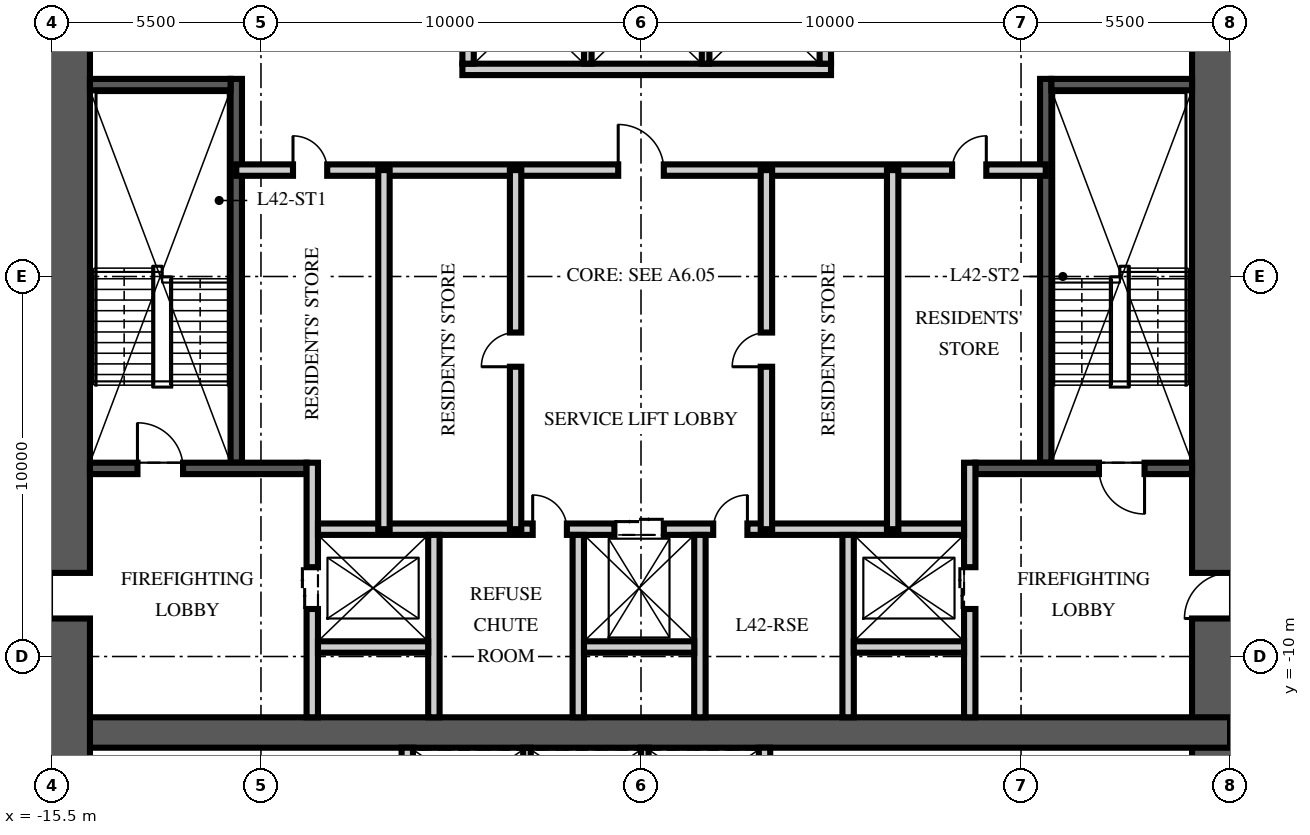
"""IFC4 building model, lengths in metres.
Left out: names, types, materials, properties, quantities, classifications, styles, units other than length and angle.
Written with IfcOpenShell. Run it as: python <this file> out.ifc"""

import sys

from ifc_helpers import new_model, si_unit, direction, frame, frame_2d, origin, place, context, subcontext, project, spatial, rectangle, extrude, element, fill, save


model = new_model("IFC4")
c1 = context("Model", 3, precision=1e-05, world=origin(), true_north=direction((0.0, 1.0)))
c2 = subcontext(c1, "Body", "Model", "MODEL_VIEW")
j1 = project(units=[si_unit("LENGTHUNIT", "METRE"), si_unit("PLANEANGLEUNIT", "RADIAN")], contexts=[c1])
p1 = place(None, origin())
s1 = spatial("IfcSite", under=j1, at=p1, CompositionType="ELEMENT")
p2 = place(p1, origin())
s2 = spatial("IfcBuilding", under=s1, at=p2, CompositionType="ELEMENT")
p3 = place(p2, frame((0.0, 0.0, 167.25)))
s3 = spatial("IfcBuildingStorey", under=s2, at=p3, CompositionType="ELEMENT", Elevation=167.25)
p4 = place(p3, frame((15.5, -15.5, -0.25), z_axis=(0.0, 0.0, 1.0), x_axis=(0.0, 1.0, 0.0)))
e1 = element("IfcWall", 1, at=p4, inside=s3, PredefinedType="SHEAR", context=c2, shape_type="SweptSolid", body=[
    extrude(rectangle(XDim=31.0, YDim=2.0, at=frame_2d((15.5, 0.0))), origin(), (0.0, 0.0, 1.0), 3.75),
])
p5 = place(p4, frame((6.5, 0.0, 0.25)))
e2 = element("IfcOpeningElement", 2, at=p5, cuts=e1, PredefinedType="OPENING", context=c2, shape_type="SweptSolid", body=[
    extrude(rectangle(XDim=1.2, YDim=2.1, at=frame_2d((0.6, 1.05))), frame((0.0, 1.01, 0.0), z_axis=(0.0, -1.0, 0.0), x_axis=(1.0, 0.0, 0.0)), (0.0, 0.0, 1.0), 2.02),
])
p6 = place(p4, frame((23.0, 0.0, 0.25)))
e3 = element("IfcOpeningElement", 3, at=p6, cuts=e1, PredefinedType="OPENING", context=c2, shape_type="SweptSolid", body=[
    extrude(rectangle(XDim=1.8, YDim=2.1, at=frame_2d((0.9, 1.05))), frame((0.0, 1.01, 0.0), z_axis=(0.0, -1.0, 0.0), x_axis=(1.0, 0.0, 0.0)), (0.0, 0.0, 1.0), 2.02),
])
p7 = place(p3, frame((-15.5, -12.0, -0.25), z_axis=(0.0, 0.0, 1.0), x_axis=(1.0, 0.0, 0.0)))
e4 = element("IfcWall", 4, at=p7, inside=s3, PredefinedType="SHEAR", context=c2, shape_type="SweptSolid", body=[
    extrude(rectangle(XDim=31.0, YDim=0.8, at=frame_2d((15.5, 0.0))), origin(), (0.0, 0.0, 1.0), 3.75),
])
p8 = place(p3, frame((-15.5, -15.5, -0.25), z_axis=(0.0, 0.0, 1.0), x_axis=(0.0, 1.0, 0.0)))
e5 = element("IfcWall", 5, at=p8, inside=s3, PredefinedType="SHEAR", context=c2, shape_type="SweptSolid", body=[
    extrude(rectangle(XDim=31.0, YDim=2.0, at=frame_2d((15.5, 0.0))), origin(), (0.0, 0.0, 1.0), 3.75),
])
p9 = place(p8, frame((6.5, 0.0, 0.25)))
e6 = element("IfcOpeningElement", 6, at=p9, cuts=e5, PredefinedType="OPENING", context=c2, shape_type="SweptSolid", body=[
    extrude(rectangle(XDim=1.2, YDim=2.1, at=frame_2d((0.6, 1.05))), frame((0.0, 1.01, 0.0), z_axis=(0.0, -1.0, 0.0), x_axis=(1.0, 0.0, 0.0)), (0.0, 0.0, 1.0), 2.02),
])
p10 = place(p8, frame((23.0, 0.0, 0.25)))
e7 = element("IfcOpeningElement", 7, at=p10, cuts=e5, PredefinedType="OPENING", context=c2, shape_type="SweptSolid", body=[
    extrude(rectangle(XDim=1.8, YDim=2.1, at=frame_2d((0.9, 1.05))), frame((0.0, 1.01, 0.0), z_axis=(0.0, -1.0, 0.0), x_axis=(1.0, 0.0, 0.0)), (0.0, 0.0, 1.0), 2.02),
])
p11 = place(p3, frame((-10.65, -4.9, 0.0), z_axis=(0.0, 0.0, 1.0), x_axis=(0.0, 1.0, 0.0)))
e8 = element("IfcWall", 8, at=p11, inside=s3, PredefinedType="SOLIDWALL", context=c2, shape_type="SweptSolid", body=[
    extrude(rectangle(XDim=10.1, YDim=0.3, at=frame_2d((5.05, 0.0))), origin(), (0.0, 0.0, 1.0), 3.5),
])
p12 = place(p3, frame((-14.5, -5.05, 0.0), z_axis=(0.0, 0.0, 1.0), x_axis=(1.0, 0.0, 0.0)))
e9 = element("IfcWall", 9, at=p12, inside=s3, PredefinedType="SOLIDWALL", context=c2, shape_type="SweptSolid", body=[
    extrude(rectangle(XDim=5.7, YDim=0.3, at=frame_2d((2.85, 0.0))), origin(), (0.0, 0.0, 1.0), 3.5),
])
p13 = place(p12, frame((1.25, 0.0, 0.0)))
e10 = element("IfcOpeningElement", 10, at=p13, cuts=e9, PredefinedType="OPENING", context=c2, shape_type="SweptSolid", body=[
    extrude(rectangle(XDim=1.2, YDim=2.1, at=frame_2d((0.6, 1.05))), frame((0.0, 0.16, 0.0), z_axis=(0.0, -1.0, 0.0), x_axis=(1.0, 0.0, 0.0)), (0.0, 0.0, 1.0), 0.32),
])
p14 = place(p3, frame((-14.5, 5.05, 0.0), z_axis=(0.0, 0.0, 1.0), x_axis=(1.0, 0.0, 0.0)))
e11 = element("IfcWall", 11, at=p14, inside=s3, PredefinedType="SOLIDWALL", context=c2, shape_type="SweptSolid", body=[
    extrude(rectangle(XDim=3.7, YDim=0.3, at=frame_2d((1.85, 0.0))), origin(), (0.0, 0.0, 1.0), 3.5),
])
p15 = place(p3, frame((-8.65, -11.6, 0.0), z_axis=(0.0, 0.0, 1.0), x_axis=(0.0, 1.0, 0.0)))
e12 = element("IfcWall", 12, at=p15, inside=s3, PredefinedType="PARTITIONING", context=c2, shape_type="SweptSolid", body=[
    extrude(rectangle(XDim=6.7, YDim=0.3, at=frame_2d((3.35, 0.0))), origin(), (0.0, 0.0, 1.0), 3.5),
])
p16 = place(p15, frame((2.85, 0.0, 0.0)))
e13 = element("IfcOpeningElement", 13, at=p16, cuts=e12, PredefinedType="OPENING", context=c2, shape_type="SweptSolid", body=[
    extrude(rectangle(XDim=1.1, YDim=2.1, at=frame_2d((0.55, 1.05))), frame((0.0, 0.16, 0.0), z_axis=(0.0, -1.0, 0.0), x_axis=(1.0, 0.0, 0.0)), (0.0, 0.0, 1.0), 0.32),
])
p17 = place(p3, frame((10.65, -4.9, 0.0), z_axis=(0.0, 0.0, 1.0), x_axis=(0.0, 1.0, 0.0)))
e14 = element("IfcWall", 14, at=p17, inside=s3, PredefinedType="SOLIDWALL", context=c2, shape_type="SweptSolid", body=[
    extrude(rectangle(XDim=10.1, YDim=0.3, at=frame_2d((5.05, 0.0))), origin(), (0.0, 0.0, 1.0), 3.5),
])
p18 = place(p3, frame((14.5, -5.05, 0.0), z_axis=(0.0, 0.0, 1.0), x_axis=(-1.0, 0.0, 0.0)))
e15 = element("IfcWall", 15, at=p18, inside=s3, PredefinedType="SOLIDWALL", context=c2, shape_type="SweptSolid", body=[
    extrude(rectangle(XDim=5.7, YDim=0.3, at=frame_2d((2.85, 0.0))), origin(), (0.0, 0.0, 1.0), 3.5),
])
p19 = place(p18, frame((1.25, 0.0, 0.0)))
e16 = element("IfcOpeningElement", 16, at=p19, cuts=e15, PredefinedType="OPENING", context=c2, shape_type="SweptSolid", body=[
    extrude(rectangle(XDim=1.2, YDim=2.1, at=frame_2d((0.6, 1.05))), frame((0.0, 0.16, 0.0), z_axis=(0.0, -1.0, 0.0), x_axis=(1.0, 0.0, 0.0)), (0.0, 0.0, 1.0), 0.32),
])
p20 = place(p3, frame((14.5, 5.05, 0.0), z_axis=(0.0, 0.0, 1.0), x_axis=(-1.0, 0.0, 0.0)))
e17 = element("IfcWall", 17, at=p20, inside=s3, PredefinedType="SOLIDWALL", context=c2, shape_type="SweptSolid", body=[
    extrude(rectangle(XDim=3.7, YDim=0.3, at=frame_2d((1.85, 0.0))), origin(), (0.0, 0.0, 1.0), 3.5),
])
p21 = place(p3, frame((8.65, -11.6, 0.0), z_axis=(0.0, 0.0, 1.0), x_axis=(0.0, 1.0, 0.0)))
e18 = element("IfcWall", 18, at=p21, inside=s3, PredefinedType="PARTITIONING", context=c2, shape_type="SweptSolid", body=[
    extrude(rectangle(XDim=6.7, YDim=0.3, at=frame_2d((3.35, 0.0))), origin(), (0.0, 0.0, 1.0), 3.5),
])
p22 = place(p21, frame((2.85, 0.0, 0.0)))
e19 = element("IfcOpeningElement", 19, at=p22, cuts=e18, PredefinedType="OPENING", context=c2, shape_type="SweptSolid", body=[
    extrude(rectangle(XDim=1.1, YDim=2.1, at=frame_2d((0.55, 1.05))), frame((0.0, 0.16, 0.0), z_axis=(0.0, -1.0, 0.0), x_axis=(1.0, 0.0, 0.0)), (0.0, 0.0, 1.0), 0.32),
])
p23 = place(p3, frame((-8.5, -6.65, 0.0), z_axis=(0.0, 0.0, 1.0), x_axis=(1.0, 0.0, 0.0)))
e20 = element("IfcWall", 20, at=p23, inside=s3, PredefinedType="PARTITIONING", context=c2, shape_type="SweptSolid", body=[
    extrude(rectangle(XDim=17.0, YDim=0.3, at=frame_2d((8.5, 0.0))), origin(), (0.0, 0.0, 1.0), 3.5),
])
p24 = place(p23, frame((7.8, 0.0, 0.0)))
e21 = element("IfcOpeningElement", 21, at=p24, cuts=e20, PredefinedType="OPENING", context=c2, shape_type="SweptSolid", body=[
    extrude(rectangle(XDim=1.3, YDim=2.4, at=frame_2d((0.65, 1.2))), frame((0.0, 0.16, 0.0), z_axis=(0.0, -1.0, 0.0), x_axis=(1.0, 0.0, 0.0)), (0.0, 0.0, 1.0), 0.32),
])
p25 = place(p23, frame((5.65, 0.0, 0.0)))
e22 = element("IfcOpeningElement", 22, at=p25, cuts=e20, PredefinedType="OPENING", context=c2, shape_type="SweptSolid", body=[
    extrude(rectangle(XDim=0.9, YDim=2.1, at=frame_2d((0.45, 1.05))), frame((0.0, 0.16, 0.0), z_axis=(0.0, -1.0, 0.0), x_axis=(1.0, 0.0, 0.0)), (0.0, 0.0, 1.0), 0.32),
])
p26 = place(p23, frame((10.4, 0.0, 0.0)))
e23 = element("IfcOpeningElement", 23, at=p26, cuts=e20, PredefinedType="OPENING", context=c2, shape_type="SweptSolid", body=[
    extrude(rectangle(XDim=0.9, YDim=2.1, at=frame_2d((0.45, 1.05))), frame((0.0, 0.16, 0.0), z_axis=(0.0, -1.0, 0.0), x_axis=(1.0, 0.0, 0.0)), (0.0, 0.0, 1.0), 0.32),
])
for number, where, z_axis, x_axis in (
    (24, (-5.45, -11.6, 0.0), (0.0, 0.0, 1.0), (0.0, 1.0, 0.0)),
    (25, (-1.65, -11.6, 0.0), (0.0, 0.0, 1.0), (0.0, 1.0, 0.0)),
    (26, (1.55, -11.6, 0.0), (0.0, 0.0, 1.0), (0.0, 1.0, 0.0)),
    (27, (5.45, -11.6, 0.0), (0.0, 0.0, 1.0), (0.0, 1.0, 0.0)),
):
    element("IfcWall", number, at=place(p3, frame(where, z_axis=z_axis, x_axis=x_axis)), inside=s3, PredefinedType="PARTITIONING", context=c2, shape_type="SweptSolid", body=[
        extrude(rectangle(XDim=4.8, YDim=0.3, at=frame_2d((2.4, 0.0))), origin(), (0.0, 0.0, 1.0), 3.5),
    ])
for number, where, z_axis, x_axis in (
    (28, (-8.5, -9.75, 0.0), (0.0, 0.0, 1.0), (1.0, 0.0, 0.0)),
    (29, (-1.5, -9.75, 0.0), (0.0, 0.0, 1.0), (1.0, 0.0, 0.0)),
    (30, (5.6, -9.75, 0.0), (0.0, 0.0, 1.0), (1.0, 0.0, 0.0)),
):
    element("IfcWall", number, at=place(p3, frame(where, z_axis=z_axis, x_axis=x_axis)), inside=s3, PredefinedType="PARTITIONING", context=c2, shape_type="SweptSolid", body=[
        extrude(rectangle(XDim=2.9, YDim=0.3, at=frame_2d((1.45, 0.0))), origin(), (0.0, 0.0, 1.0), 3.5),
    ])
p27 = place(p3, frame((-4.7, 5.45, 0.0), z_axis=(0.0, 0.0, 1.0), x_axis=(1.0, 0.0, 0.0)))
e31 = element("IfcWall", 31, at=p27, inside=s3, PredefinedType="PARTITIONING", context=c2, shape_type="SweptSolid", body=[
    extrude(rectangle(XDim=9.7, YDim=0.3, at=frame_2d((4.85, 0.0))), origin(), (0.0, 0.0, 1.0), 3.5),
])
for number, where, z_axis, x_axis in (
    (32, (-4.55, 5.6, 0.0), (0.0, 0.0, 1.0), (0.0, 1.0, 0.0)),
    (33, (4.85, 5.6, 0.0), (0.0, 0.0, 1.0), (0.0, 1.0, 0.0)),
):
    element("IfcWall", number, at=place(p3, frame(where, z_axis=z_axis, x_axis=x_axis)), inside=s3, PredefinedType="PARTITIONING", context=c2, shape_type="SweptSolid", body=[
        extrude(rectangle(XDim=2.8, YDim=0.3, at=frame_2d((1.4, 0.0))), origin(), (0.0, 0.0, 1.0), 3.5),
    ])
for number, where, z_axis, x_axis in (
    (34, (-1.4, 5.6, 0.0), (0.0, 0.0, 1.0), (0.0, 1.0, 0.0)),
    (35, (1.7, 5.6, 0.0), (0.0, 0.0, 1.0), (0.0, 1.0, 0.0)),
):
    element("IfcWall", number, at=place(p3, frame(where, z_axis=z_axis, x_axis=x_axis)), inside=s3, PredefinedType="PARTITIONING", context=c2, shape_type="SweptSolid", body=[
        extrude(rectangle(XDim=2.8, YDim=0.2, at=frame_2d((1.4, 0.0))), origin(), (0.0, 0.0, 1.0), 3.5),
    ])
for number, where, z_axis, x_axis in (
    (36, (-6.15, -14.5, 0.0), (0.0, 0.0, 1.0), (0.0, 1.0, 0.0)),
    (37, (3.25, -14.5, 0.0), (0.0, 0.0, 1.0), (0.0, 1.0, 0.0)),
):
    element("IfcWall", number, at=place(p3, frame(where, z_axis=z_axis, x_axis=x_axis)), inside=s3, PredefinedType="PARTITIONING", context=c2, shape_type="SweptSolid", body=[
        extrude(rectangle(XDim=2.1, YDim=0.3, at=frame_2d((1.05, 0.0))), origin(), (0.0, 0.0, 1.0), 3.5),
    ])
for number, where, z_axis, x_axis in (
    (38, (-3.0, -14.5, 0.0), (0.0, 0.0, 1.0), (0.0, 1.0, 0.0)),
    (39, (0.1, -14.5, 0.0), (0.0, 0.0, 1.0), (0.0, 1.0, 0.0)),
):
    element("IfcWall", number, at=place(p3, frame(where, z_axis=z_axis, x_axis=x_axis)), inside=s3, PredefinedType="PARTITIONING", context=c2, shape_type="SweptSolid", body=[
        extrude(rectangle(XDim=2.1, YDim=0.2, at=frame_2d((1.05, 0.0))), origin(), (0.0, 0.0, 1.0), 3.5),
    ])
p28 = place(p3, frame((-10.65, 2.8, 0.0), z_axis=(0.0, 0.0, 1.0), x_axis=(1.0, 0.0, 0.0)))
e40 = element("IfcWall", 40, at=p28, inside=s3, PredefinedType="PARTITIONING", context=c2, shape_type="SweptSolid", body=[
    extrude(rectangle(XDim=21.3, YDim=0.3, at=frame_2d((10.65, 0.0))), origin(), (0.0, 0.0, 1.0), 3.5),
])
p29 = place(p28, frame((10.05, 0.0, 0.0)))
e41 = element("IfcOpeningElement", 41, at=p29, cuts=e40, PredefinedType="OPENING", context=c2, shape_type="SweptSolid", body=[
    extrude(rectangle(XDim=1.2, YDim=2.1, at=frame_2d((0.6, 1.05))), frame((0.0, 0.16, 0.0), z_axis=(0.0, -1.0, 0.0), x_axis=(1.0, 0.0, 0.0)), (0.0, 0.0, 1.0), 0.32),
])
p30 = place(p28, frame((1.493, 0.0, 0.0)))
e42 = element("IfcOpeningElement", 42, at=p30, cuts=e40, PredefinedType="OPENING", context=c2, shape_type="SweptSolid", body=[
    extrude(rectangle(XDim=0.9, YDim=2.1, at=frame_2d((0.45, 1.05))), frame((0.0, 0.16, 0.0), z_axis=(0.0, -1.0, 0.0), x_axis=(1.0, 0.0, 0.0)), (0.0, 0.0, 1.0), 0.32),
])
p31 = place(p28, frame((18.836, 0.0, 0.0)))
e43 = element("IfcOpeningElement", 43, at=p31, cuts=e40, PredefinedType="OPENING", context=c2, shape_type="SweptSolid", body=[
    extrude(rectangle(XDim=0.9, YDim=2.1, at=frame_2d((0.45, 1.05))), frame((0.0, 0.16, 0.0), z_axis=(0.0, -1.0, 0.0), x_axis=(1.0, 0.0, 0.0)), (0.0, 0.0, 1.0), 0.32),
])
p32 = place(p3, frame((-3.3, -6.65, 0.0), z_axis=(0.0, 0.0, 1.0), x_axis=(0.0, 1.0, 0.0)))
e44 = element("IfcWall", 44, at=p32, inside=s3, PredefinedType="PARTITIONING", context=c2, shape_type="SweptSolid", body=[
    extrude(rectangle(XDim=9.45, YDim=0.3, at=frame_2d((4.725, 0.0))), origin(), (0.0, 0.0, 1.0), 3.5),
])
p33 = place(p32, frame((4.275, 0.0, 0.0)))
e45 = element("IfcOpeningElement", 45, at=p33, cuts=e44, PredefinedType="OPENING", context=c2, shape_type="SweptSolid", body=[
    extrude(rectangle(XDim=0.9, YDim=2.1, at=frame_2d((0.45, 1.05))), frame((0.0, 0.16, 0.0), z_axis=(0.0, -1.0, 0.0), x_axis=(1.0, 0.0, 0.0)), (0.0, 0.0, 1.0), 0.32),
])
p34 = place(p3, frame((3.3, -6.65, 0.0), z_axis=(0.0, 0.0, 1.0), x_axis=(0.0, 1.0, 0.0)))
e46 = element("IfcWall", 46, at=p34, inside=s3, PredefinedType="PARTITIONING", context=c2, shape_type="SweptSolid", body=[
    extrude(rectangle(XDim=9.45, YDim=0.3, at=frame_2d((4.725, 0.0))), origin(), (0.0, 0.0, 1.0), 3.5),
])
p35 = place(p34, frame((4.275, 0.0, 0.0)))
e47 = element("IfcOpeningElement", 47, at=p35, cuts=e46, PredefinedType="OPENING", context=c2, shape_type="SweptSolid", body=[
    extrude(rectangle(XDim=0.9, YDim=2.1, at=frame_2d((0.45, 1.05))), frame((0.0, 0.16, 0.0), z_axis=(0.0, -1.0, 0.0), x_axis=(1.0, 0.0, 0.0)), (0.0, 0.0, 1.0), 0.32),
])
for number, where, z_axis, x_axis in (
    (48, (-6.764, -6.65, 0.0), (0.0, 0.0, 1.0), (0.0, 1.0, 0.0)),
    (49, (6.622, -6.65, 0.0), (0.0, 0.0, 1.0), (0.0, 1.0, 0.0)),
):
    element("IfcWall", number, at=place(p3, frame(where, z_axis=z_axis, x_axis=x_axis)), inside=s3, PredefinedType="PARTITIONING", context=c2, shape_type="SweptSolid", body=[
        extrude(rectangle(XDim=9.45, YDim=0.3, at=frame_2d((4.725, 0.0))), origin(), (0.0, 0.0, 1.0), 3.5),
    ])
p36 = place(p13, origin())
e50 = element("IfcDoor", 50, at=p36, inside=s3, OperationType="SINGLE_SWING_LEFT", PredefinedType="DOOR", context=c2, shape_type="SweptSolid", body=[
    extrude(rectangle(XDim=1.2, YDim=2.1, at=frame_2d((0.6, 1.05))), frame((0.0, 0.025, 0.0), z_axis=(0.0, -1.0, 0.0), x_axis=(1.0, 0.0, 0.0)), (0.0, 0.0, 1.0), 0.05),
])
fill(e10, e50)
p37 = place(p9, origin())
e51 = element("IfcDoor", 51, at=p37, inside=s3, OperationType="SINGLE_SWING_LEFT", PredefinedType="DOOR", context=c2, shape_type="SweptSolid", body=[
    extrude(rectangle(XDim=1.2, YDim=2.1, at=frame_2d((0.6, 1.05))), frame((0.0, 0.025, 0.0), z_axis=(0.0, -1.0, 0.0), x_axis=(1.0, 0.0, 0.0)), (0.0, 0.0, 1.0), 0.05),
])
fill(e6, e51)
p38 = place(p19, origin())
e52 = element("IfcDoor", 52, at=p38, inside=s3, OperationType="SINGLE_SWING_LEFT", PredefinedType="DOOR", context=c2, shape_type="SweptSolid", body=[
    extrude(rectangle(XDim=1.2, YDim=2.1, at=frame_2d((0.6, 1.05))), frame((0.0, 0.025, 0.0), z_axis=(0.0, -1.0, 0.0), x_axis=(1.0, 0.0, 0.0)), (0.0, 0.0, 1.0), 0.05),
])
fill(e16, e52)
p39 = place(p5, origin())
e53 = element("IfcDoor", 53, at=p39, inside=s3, OperationType="SINGLE_SWING_LEFT", PredefinedType="DOOR", context=c2, shape_type="SweptSolid", body=[
    extrude(rectangle(XDim=1.2, YDim=2.1, at=frame_2d((0.6, 1.05))), frame((0.0, 0.025, 0.0), z_axis=(0.0, -1.0, 0.0), x_axis=(1.0, 0.0, 0.0)), (0.0, 0.0, 1.0), 0.05),
])
fill(e2, e53)
p40 = place(p16, origin())
e54 = element("IfcDoor", 54, at=p40, inside=s3, OperationType="DOUBLE_DOOR_SLIDING", PredefinedType="DOOR", context=c2, shape_type="SweptSolid", body=[
    extrude(rectangle(XDim=1.1, YDim=2.1, at=frame_2d((0.55, 1.05))), frame((0.0, 0.025, 0.0), z_axis=(0.0, -1.0, 0.0), x_axis=(1.0, 0.0, 0.0)), (0.0, 0.0, 1.0), 0.05),
])
fill(e13, e54)
p41 = place(p22, origin())
e55 = element("IfcDoor", 55, at=p41, inside=s3, OperationType="DOUBLE_DOOR_SLIDING", PredefinedType="DOOR", context=c2, shape_type="SweptSolid", body=[
    extrude(rectangle(XDim=1.1, YDim=2.1, at=frame_2d((0.55, 1.05))), frame((0.0, 0.025, 0.0), z_axis=(0.0, -1.0, 0.0), x_axis=(1.0, 0.0, 0.0)), (0.0, 0.0, 1.0), 0.05),
])
fill(e19, e55)
p42 = place(p24, origin())
e56 = element("IfcDoor", 56, at=p42, inside=s3, OperationType="DOUBLE_DOOR_SLIDING", PredefinedType="DOOR", context=c2, shape_type="SweptSolid", body=[
    extrude(rectangle(XDim=1.3, YDim=2.4, at=frame_2d((0.65, 1.2))), frame((0.0, 0.025, 0.0), z_axis=(0.0, -1.0, 0.0), x_axis=(1.0, 0.0, 0.0)), (0.0, 0.0, 1.0), 0.05),
])
fill(e21, e56)
p43 = place(p29, origin())
e57 = element("IfcDoor", 57, at=p43, inside=s3, OperationType="SINGLE_SWING_LEFT", PredefinedType="DOOR", context=c2, shape_type="SweptSolid", body=[
    extrude(rectangle(XDim=1.2, YDim=2.1, at=frame_2d((0.6, 1.05))), frame((0.0, 0.025, 0.0), z_axis=(0.0, -1.0, 0.0), x_axis=(1.0, 0.0, 0.0)), (0.0, 0.0, 1.0), 0.05),
])
fill(e41, e57)
p44 = place(p25, origin())
e58 = element("IfcDoor", 58, at=p44, inside=s3, OperationType="SINGLE_SWING_LEFT", PredefinedType="DOOR", context=c2, shape_type="SweptSolid", body=[
    extrude(rectangle(XDim=0.9, YDim=2.1, at=frame_2d((0.45, 1.05))), frame((0.0, 0.025, 0.0), z_axis=(0.0, -1.0, 0.0), x_axis=(1.0, 0.0, 0.0)), (0.0, 0.0, 1.0), 0.05),
])
fill(e22, e58)
p45 = place(p26, origin())
e59 = element("IfcDoor", 59, at=p45, inside=s3, OperationType="SINGLE_SWING_RIGHT", PredefinedType="DOOR", context=c2, shape_type="SweptSolid", body=[
    extrude(rectangle(XDim=0.9, YDim=2.1, at=frame_2d((0.45, 1.05))), frame((0.0, 0.025, 0.0), z_axis=(0.0, -1.0, 0.0), x_axis=(1.0, 0.0, 0.0)), (0.0, 0.0, 1.0), 0.05),
])
fill(e23, e59)
p46 = place(p33, origin())
e60 = element("IfcDoor", 60, at=p46, inside=s3, OperationType="SINGLE_SWING_LEFT", PredefinedType="DOOR", context=c2, shape_type="SweptSolid", body=[
    extrude(rectangle(XDim=0.9, YDim=2.1, at=frame_2d((0.45, 1.05))), frame((0.0, 0.025, 0.0), z_axis=(0.0, -1.0, 0.0), x_axis=(1.0, 0.0, 0.0)), (0.0, 0.0, 1.0), 0.05),
])
fill(e45, e60)
p47 = place(p30, origin())
e61 = element("IfcDoor", 61, at=p47, inside=s3, OperationType="SINGLE_SWING_LEFT", PredefinedType="DOOR", context=c2, shape_type="SweptSolid", body=[
    extrude(rectangle(XDim=0.9, YDim=2.1, at=frame_2d((0.45, 1.05))), frame((0.0, 0.025, 0.0), z_axis=(0.0, -1.0, 0.0), x_axis=(1.0, 0.0, 0.0)), (0.0, 0.0, 1.0), 0.05),
])
fill(e42, e61)
p48 = place(p35, origin())
e62 = element("IfcDoor", 62, at=p48, inside=s3, OperationType="SINGLE_SWING_LEFT", PredefinedType="DOOR", context=c2, shape_type="SweptSolid", body=[
    extrude(rectangle(XDim=0.9, YDim=2.1, at=frame_2d((0.45, 1.05))), frame((0.0, 0.025, 0.0), z_axis=(0.0, -1.0, 0.0), x_axis=(1.0, 0.0, 0.0)), (0.0, 0.0, 1.0), 0.05),
])
fill(e47, e62)
p49 = place(p31, origin())
e63 = element("IfcDoor", 63, at=p49, inside=s3, OperationType="SINGLE_SWING_RIGHT", PredefinedType="DOOR", context=c2, shape_type="SweptSolid", body=[
    extrude(rectangle(XDim=0.9, YDim=2.1, at=frame_2d((0.45, 1.05))), frame((0.0, 0.025, 0.0), z_axis=(0.0, -1.0, 0.0), x_axis=(1.0, 0.0, 0.0)), (0.0, 0.0, 1.0), 0.05),
])
fill(e43, e63)
save(model, sys.argv[1])
